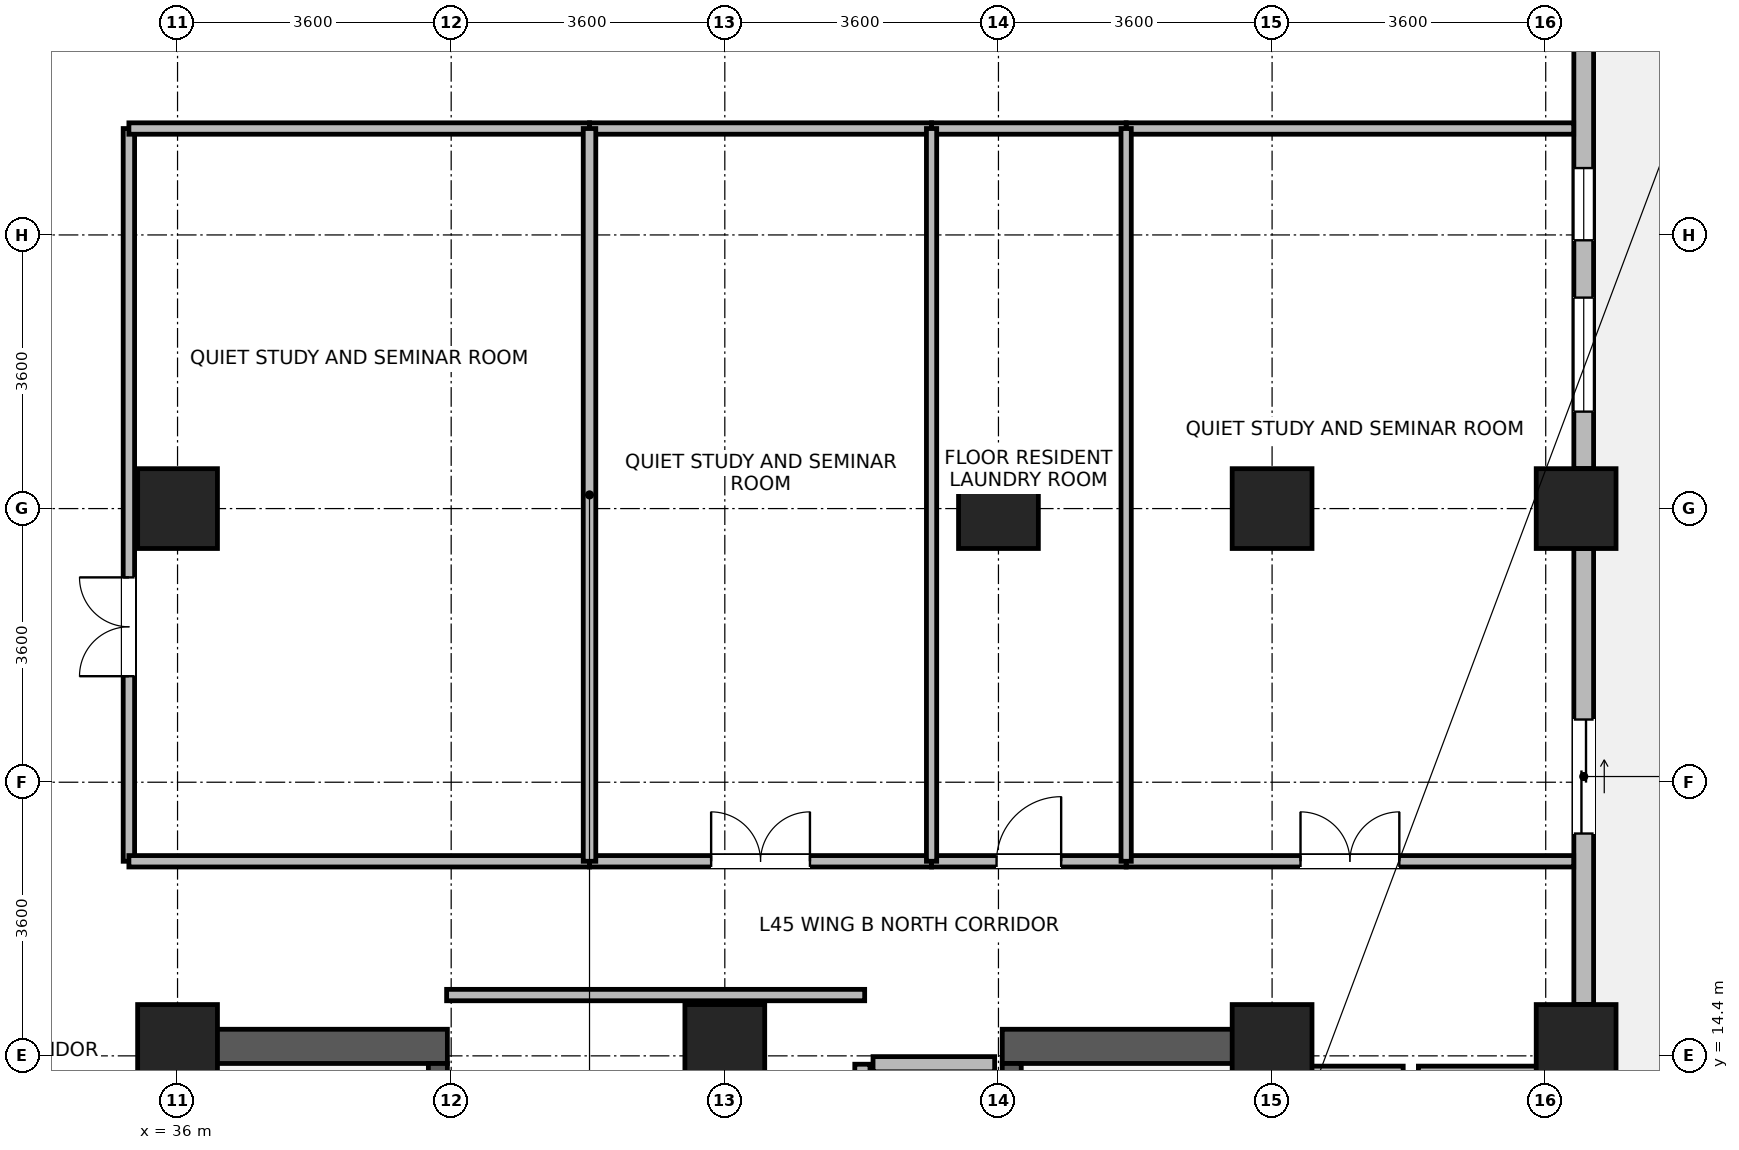
"""IFC4 building model, lengths in metres.
Left out: names, types, materials, properties, quantities, classifications, styles, units other than length and angle.
Written with IfcOpenShell. Run it as: python <this file> out.ifc"""

import sys

from ifc_helpers import new_model, si_unit, direction, frame, frame_2d, origin, origin_2d, place, context, subcontext, project, spatial, rectangle, extrude, source, transform, mapped, element, fill, save


model = new_model("IFC4")
c1 = context("Model", 3, precision=1e-05, world=origin(), true_north=direction((0.0, 1.0)))
c2 = subcontext(c1, "Body", "Model", "MODEL_VIEW")
j1 = project(units=[si_unit("LENGTHUNIT", "METRE"), si_unit("PLANEANGLEUNIT", "RADIAN")], contexts=[c1])
p1 = place(None, origin())
s1 = spatial("IfcSite", under=j1, at=p1, CompositionType="ELEMENT")
p2 = place(p1, origin())
s2 = spatial("IfcBuilding", under=s1, at=p2, CompositionType="ELEMENT")
p3 = place(p2, frame((0.0, 0.0, 177.2)))
s3 = spatial("IfcBuildingStorey", under=s2, at=p3, CompositionType="ELEMENT", Elevation=177.2)
for number, where, z_axis, x_axis in (
    (1, (36.125, 6.85, 0.0), (0.0, 0.0, 1.0), (0.0, 1.0, 0.0)),
    (2, (50.275, 6.85, 0.0), (0.0, 0.0, 1.0), (0.0, 1.0, 0.0)),
):
    element("IfcWall", number, at=place(p3, frame(where, z_axis=z_axis, x_axis=x_axis)), inside=s3, PredefinedType="SHEAR", context=c2, shape_type="SweptSolid", body=[
        extrude(rectangle(XDim=7.9, YDim=0.45, at=frame_2d((3.95, 0.0))), origin(), (0.0, 0.0, 1.0), 3.46),
    ])
for number, where, z_axis, x_axis in (
    (3, (36.35, 14.525, 0.0), (0.0, 0.0, 1.0), (1.0, 0.0, 0.0)),
    (4, (46.85, 14.525, 0.0), (0.0, 0.0, 1.0), (1.0, 0.0, 0.0)),
):
    element("IfcWall", number, at=place(p3, frame(where, z_axis=z_axis, x_axis=x_axis)), inside=s3, PredefinedType="SHEAR", context=c2, shape_type="SweptSolid", body=[
        extrude(rectangle(XDim=3.2, YDim=0.45, at=frame_2d((1.6, 0.0))), origin(), (0.0, 0.0, 1.0), 3.46),
    ])
p4 = place(p3, frame((39.425, 7.3, 0.0), z_axis=(0.0, 0.0, 1.0), x_axis=(0.0, 1.0, 0.0)))
e5 = element("IfcWall", 5, at=p4, inside=s3, PredefinedType="SHEAR", context=c2, shape_type="SweptSolid", body=[
    extrude(rectangle(XDim=7.0, YDim=0.25, at=frame_2d((3.5, 0.0))), origin(), (0.0, 0.0, 1.0), 3.46),
])
p5 = place(p4, frame((0.15, 0.0, 0.0)))
e6 = element("IfcOpeningElement", 6, at=p5, cuts=e5, PredefinedType="OPENING", context=c2, shape_type="SweptSolid", body=[
    extrude(rectangle(XDim=1.1, YDim=2.08, at=frame_2d((0.55, 1.04))), frame((0.0, 0.135, 0.0), z_axis=(0.0, -1.0, 0.0), x_axis=(1.0, 0.0, 0.0)), (0.0, 0.0, 1.0), 0.27),
])
p6 = place(p3, frame((46.975, 7.3, 0.0), z_axis=(0.0, 0.0, 1.0), x_axis=(0.0, 1.0, 0.0)))
e7 = element("IfcWall", 7, at=p6, inside=s3, PredefinedType="SHEAR", context=c2, shape_type="SweptSolid", body=[
    extrude(rectangle(XDim=7.0, YDim=0.25, at=frame_2d((3.5, 0.0))), origin(), (0.0, 0.0, 1.0), 3.46),
])
p7 = place(p6, frame((0.15, 0.0, 0.0)))
e8 = element("IfcOpeningElement", 8, at=p7, cuts=e7, PredefinedType="OPENING", context=c2, shape_type="SweptSolid", body=[
    extrude(rectangle(XDim=1.1, YDim=2.08, at=frame_2d((0.55, 1.04))), frame((0.0, 0.135, 0.0), z_axis=(0.0, -1.0, 0.0), x_axis=(1.0, 0.0, 0.0)), (0.0, 0.0, 1.0), 0.27),
])
m1 = source(origin(), c2, "Body", "SweptSolid", [
    extrude(rectangle(XDim=1.05, YDim=1.05, at=origin_2d()), origin(), (0.0, 0.0, 1.0), 3.7),
])
for number, where, z_axis, x_axis in (
    (9, (36.0, 21.6, 0.0), (0.0, 0.0, 1.0), (1.0, 0.0, 0.0)),
    (10, (46.8, 21.6, 0.0), (0.0, 0.0, 1.0), (1.0, 0.0, 0.0)),
    (11, (36.0, 14.55, 0.0), (0.0, 0.0, 1.0), (1.0, 0.0, 0.0)),
    (12, (43.2, 14.55, 0.0), (0.0, 0.0, 1.0), (1.0, 0.0, 0.0)),
    (13, (50.4, 14.55, 0.0), (0.0, 0.0, 1.0), (1.0, 0.0, 0.0)),
    (14, (50.4, 21.6, 0.0), (0.0, 0.0, 1.0), (1.0, 0.0, 0.0)),
    (15, (54.4, 14.55, 0.0), (0.0, 0.0, 1.0), (1.0, 0.0, 0.0)),
    (16, (54.4, 21.6, 0.0), (0.0, 0.0, 1.0), (1.0, 0.0, 0.0)),
):
    element("IfcColumn", number, at=place(p3, frame(where, z_axis=z_axis, x_axis=x_axis)), inside=s3, PredefinedType="COLUMN", context=c2, shape_type="MappedRepresentation", body=[
        mapped(m1, transform((0.0, 0.0, 0.0), x_axis=(1.0, 0.0, 0.0), y_axis=(0.0, 1.0, 0.0), z_axis=(0.0, 0.0, 1.0), scale=1.0)),
    ])
p8 = place(p3, frame((54.5, 21.074, 0.0), z_axis=(0.0, 0.0, 1.0), x_axis=(0.0, -1.0, 0.0)))
e17 = element("IfcWall", 17, at=p8, inside=s3, PredefinedType="STANDARD", context=c2, shape_type="SweptSolid", body=[
    extrude(rectangle(XDim=5.998, YDim=0.26, at=frame_2d((2.999, 0.0))), origin(), (0.0, 0.0, 1.0), 2.99),
])
p9 = place(p8, frame((2.249, 0.0, 0.0)))
e18 = element("IfcOpeningElement", 18, at=p9, cuts=e17, PredefinedType="OPENING", context=c2, shape_type="SweptSolid", body=[
    extrude(rectangle(XDim=1.5, YDim=2.15, at=frame_2d((0.75, 1.075))), frame((0.0, 0.14, 0.0), z_axis=(0.0, -1.0, 0.0), x_axis=(1.0, 0.0, 0.0)), (0.0, 0.0, 1.0), 0.28),
])
p10 = place(p3, frame((54.5, 28.124, 0.0), z_axis=(0.0, 0.0, 1.0), x_axis=(0.0, -1.0, 0.0)))
e19 = element("IfcWall", 19, at=p10, inside=s3, PredefinedType="STANDARD", context=c2, shape_type="SweptSolid", body=[
    extrude(rectangle(XDim=5.998, YDim=0.26, at=frame_2d((2.999, 0.0))), origin(), (0.0, 0.0, 1.0), 2.99),
])
p11 = place(p10, frame((3.749, 0.0, 0.85)))
e20 = element("IfcOpeningElement", 20, at=p11, cuts=e19, PredefinedType="OPENING", context=c2, shape_type="SweptSolid", body=[
    extrude(rectangle(XDim=1.5, YDim=1.85, at=frame_2d((0.75, 0.925))), frame((0.0, 0.14, 0.0), z_axis=(0.0, -1.0, 0.0), x_axis=(1.0, 0.0, 0.0)), (0.0, 0.0, 1.0), 0.28),
])
p12 = place(p10, frame((2.044, 0.0, 0.85)))
e21 = element("IfcOpeningElement", 21, at=p12, cuts=e19, PredefinedType="OPENING", context=c2, shape_type="SweptSolid", body=[
    extrude(rectangle(XDim=0.95, YDim=1.75, at=frame_2d((0.475, 0.875))), frame((0.0, 0.14, 0.0), z_axis=(0.0, -1.0, 0.0), x_axis=(1.0, 0.0, 0.0)), (0.0, 0.0, 1.0), 0.28),
])
p13 = place(p3, frame((50.475, 14.165, 0.0), z_axis=(0.0, 0.0, 1.0), x_axis=(1.0, 0.0, 0.0)))
e22 = element("IfcWall", 22, at=p13, inside=s3, PredefinedType="PARTITIONING", context=c2, shape_type="SweptSolid", body=[
    extrude(rectangle(XDim=1.65, YDim=0.2, at=frame_2d((0.825, 0.0))), origin(), (0.0, 0.0, 1.0), 3.44),
])
p14 = place(p3, frame((52.325, 14.165, 0.0), z_axis=(0.0, 0.0, 1.0), x_axis=(1.0, 0.0, 0.0)))
e23 = element("IfcWall", 23, at=p14, inside=s3, PredefinedType="PARTITIONING", context=c2, shape_type="SweptSolid", body=[
    extrude(rectangle(XDim=1.65, YDim=0.2, at=frame_2d((0.825, 0.0))), origin(), (0.0, 0.0, 1.0), 3.44),
])
p15 = place(p3, frame((45.15, 14.29, 0.0), z_axis=(0.0, 0.0, 1.0), x_axis=(1.0, 0.0, 0.0)))
e24 = element("IfcWall", 24, at=p15, inside=s3, PredefinedType="PARTITIONING", context=c2, shape_type="SweptSolid", body=[
    extrude(rectangle(XDim=1.6, YDim=0.2, at=frame_2d((0.8, 0.0))), origin(), (0.0, 0.0, 1.0), 2.44),
])
p16 = place(p3, frame((45.01, 11.61, 0.0), z_axis=(0.0, 0.0, 1.0), x_axis=(0.0, 1.0, 0.0)))
e25 = element("IfcWall", 25, at=p16, inside=s3, PredefinedType="PARTITIONING", context=c2, shape_type="SweptSolid", body=[
    extrude(rectangle(XDim=2.68, YDim=0.2, at=frame_2d((1.34, 0.0))), origin(), (0.0, 0.0, 1.0), 3.44),
])
p17 = place(p3, frame((35.36, 16.96, 0.0), z_axis=(0.0, 0.0, 1.0), x_axis=(0.0, 1.0, 0.0)))
e26 = element("IfcWall", 26, at=p17, inside=s3, PredefinedType="PARTITIONING", context=c2, shape_type="SweptSolid", body=[
    extrude(rectangle(XDim=9.64, YDim=0.15, at=frame_2d((4.82, 0.0))), origin(), (0.0, 0.0, 1.0), 3.44),
])
p18 = place(p17, frame((2.435, 0.0, 0.0)))
e27 = element("IfcOpeningElement", 27, at=p18, cuts=e26, PredefinedType="OPENING", context=c2, shape_type="SweptSolid", body=[
    extrude(rectangle(XDim=1.3, YDim=2.12, at=frame_2d((0.65, 1.06))), frame((0.0, 0.085, 0.0), z_axis=(0.0, -1.0, 0.0), x_axis=(1.0, 0.0, 0.0)), (0.0, 0.0, 1.0), 0.17),
])
for number, where, z_axis, x_axis in (
    (28, (35.36, 16.96, 0.0), (0.0, 0.0, 1.0), (1.0, 0.0, 0.0)),
    (29, (35.36, 26.6, 0.0), (0.0, 0.0, 1.0), (1.0, 0.0, 0.0)),
):
    element("IfcWall", number, at=place(p3, frame(where, z_axis=z_axis, x_axis=x_axis)), inside=s3, PredefinedType="PARTITIONING", context=c2, shape_type="SweptSolid", body=[
        extrude(rectangle(XDim=6.06, YDim=0.15, at=frame_2d((3.03, 0.0))), origin(), (0.0, 0.0, 1.0), 3.44),
    ])
p19 = place(p3, frame((48.48, 16.96, 0.0), z_axis=(0.0, 0.0, 1.0), x_axis=(1.0, 0.0, 0.0)))
e30 = element("IfcWall", 30, at=p19, inside=s3, PredefinedType="PARTITIONING", context=c2, shape_type="SweptSolid", body=[
    extrude(rectangle(XDim=5.888, YDim=0.15, at=frame_2d((2.944, 0.0))), origin(), (0.0, 0.0, 1.0), 3.44),
])
p20 = place(p19, frame((2.294, 0.0, 0.0)))
e31 = element("IfcOpeningElement", 31, at=p20, cuts=e30, PredefinedType="OPENING", context=c2, shape_type="SweptSolid", body=[
    extrude(rectangle(XDim=1.3, YDim=2.12, at=frame_2d((0.65, 1.06))), frame((0.0, 0.085, 0.0), z_axis=(0.0, -1.0, 0.0), x_axis=(1.0, 0.0, 0.0)), (0.0, 0.0, 1.0), 0.17),
])
p21 = place(p3, frame((48.48, 26.6, 0.0), z_axis=(0.0, 0.0, 1.0), x_axis=(1.0, 0.0, 0.0)))
e32 = element("IfcWall", 32, at=p21, inside=s3, PredefinedType="PARTITIONING", context=c2, shape_type="SweptSolid", body=[
    extrude(rectangle(XDim=5.888, YDim=0.15, at=frame_2d((2.944, 0.0))), origin(), (0.0, 0.0, 1.0), 3.44),
])
p22 = place(p3, frame((39.54, 15.2, 0.0), z_axis=(0.0, 0.0, 1.0), x_axis=(1.0, 0.0, 0.0)))
e33 = element("IfcWall", 33, at=p22, inside=s3, PredefinedType="PARTITIONING", context=c2, shape_type="SweptSolid", body=[
    extrude(rectangle(XDim=5.5, YDim=0.15, at=frame_2d((2.75, 0.0))), origin(), (0.0, 0.0, 1.0), 3.44),
])
p23 = place(p3, frame((41.42, 16.96, 0.0), z_axis=(0.0, 0.0, 1.0), x_axis=(1.0, 0.0, 0.0)))
e34 = element("IfcWall", 34, at=p23, inside=s3, PredefinedType="PARTITIONING", context=c2, shape_type="SweptSolid", body=[
    extrude(rectangle(XDim=4.5, YDim=0.15, at=frame_2d((2.25, 0.0))), origin(), (0.0, 0.0, 1.0), 3.44),
])
p24 = place(p23, frame((1.6, 0.0, 0.0)))
e35 = element("IfcOpeningElement", 35, at=p24, cuts=e34, PredefinedType="OPENING", context=c2, shape_type="SweptSolid", body=[
    extrude(rectangle(XDim=1.3, YDim=2.12, at=frame_2d((0.65, 1.06))), frame((0.0, 0.085, 0.0), z_axis=(0.0, -1.0, 0.0), x_axis=(1.0, 0.0, 0.0)), (0.0, 0.0, 1.0), 0.17),
])
p25 = place(p3, frame((41.42, 26.6, 0.0), z_axis=(0.0, 0.0, 1.0), x_axis=(1.0, 0.0, 0.0)))
e36 = element("IfcWall", 36, at=p25, inside=s3, PredefinedType="PARTITIONING", context=c2, shape_type="SweptSolid", body=[
    extrude(rectangle(XDim=4.5, YDim=0.15, at=frame_2d((2.25, 0.0))), origin(), (0.0, 0.0, 1.0), 3.44),
])
p26 = place(p3, frame((45.92, 16.96, 0.0), z_axis=(0.0, 0.0, 1.0), x_axis=(1.0, 0.0, 0.0)))
e37 = element("IfcWall", 37, at=p26, inside=s3, PredefinedType="PARTITIONING", context=c2, shape_type="SweptSolid", body=[
    extrude(rectangle(XDim=2.56, YDim=0.15, at=frame_2d((1.28, 0.0))), origin(), (0.0, 0.0, 1.0), 3.44),
])
p27 = place(p26, frame((0.855, 0.0, 0.0)))
e38 = element("IfcOpeningElement", 38, at=p27, cuts=e37, PredefinedType="OPENING", context=c2, shape_type="SweptSolid", body=[
    extrude(rectangle(XDim=0.85, YDim=2.04, at=frame_2d((0.425, 1.02))), frame((0.0, 0.085, 0.0), z_axis=(0.0, -1.0, 0.0), x_axis=(1.0, 0.0, 0.0)), (0.0, 0.0, 1.0), 0.17),
])
p28 = place(p3, frame((45.92, 26.6, 0.0), z_axis=(0.0, 0.0, 1.0), x_axis=(1.0, 0.0, 0.0)))
e39 = element("IfcWall", 39, at=p28, inside=s3, PredefinedType="PARTITIONING", context=c2, shape_type="SweptSolid", body=[
    extrude(rectangle(XDim=2.56, YDim=0.15, at=frame_2d((1.28, 0.0))), origin(), (0.0, 0.0, 1.0), 3.44),
])
p29 = place(p3, frame((41.42, 16.96, 0.0), z_axis=(0.0, 0.0, 1.0), x_axis=(0.0, 1.0, 0.0)))
e40 = element("IfcWall", 40, at=p29, inside=s3, PredefinedType="PARTITIONING", context=c2, shape_type="SweptSolid", body=[
    extrude(rectangle(XDim=9.64, YDim=0.165, at=frame_2d((4.82, 0.0))), origin(), (0.0, 0.0, 1.0), 3.44),
])
for number, where, z_axis, x_axis in (
    (41, (45.92, 16.96, 0.0), (0.0, 0.0, 1.0), (0.0, 1.0, 0.0)),
    (42, (48.48, 16.96, 0.0), (0.0, 0.0, 1.0), (0.0, 1.0, 0.0)),
):
    element("IfcWall", number, at=place(p3, frame(where, z_axis=z_axis, x_axis=x_axis)), inside=s3, PredefinedType="PARTITIONING", context=c2, shape_type="SweptSolid", body=[
        extrude(rectangle(XDim=9.64, YDim=0.135, at=frame_2d((4.82, 0.0))), origin(), (0.0, 0.0, 1.0), 3.44),
    ])
p30 = place(p9, origin())
e43 = element("IfcDoor", 43, at=p30, inside=s3, OperationType="SLIDING_TO_LEFT", PredefinedType="DOOR", context=c2, shape_type="SweptSolid", body=[
    extrude(rectangle(XDim=1.5, YDim=2.15, at=frame_2d((0.75, 1.075))), frame((0.0, 0.025, 0.0), z_axis=(0.0, -1.0, 0.0), x_axis=(1.0, 0.0, 0.0)), (0.0, 0.0, 1.0), 0.05),
])
fill(e18, e43)
p31 = place(p11, origin())
e44 = element("IfcWindow", 44, at=p31, inside=s3, PartitioningType="SINGLE_PANEL", PredefinedType="WINDOW", context=c2, shape_type="SweptSolid", body=[
    extrude(rectangle(XDim=1.5, YDim=1.85, at=frame_2d((0.75, 0.925))), frame((0.0, 0.03, 0.0), z_axis=(0.0, -1.0, 0.0), x_axis=(1.0, 0.0, 0.0)), (0.0, 0.0, 1.0), 0.06),
])
fill(e20, e44)
p32 = place(p12, origin())
e45 = element("IfcWindow", 45, at=p32, inside=s3, PartitioningType="SINGLE_PANEL", PredefinedType="WINDOW", context=c2, shape_type="SweptSolid", body=[
    extrude(rectangle(XDim=0.95, YDim=1.75, at=frame_2d((0.475, 0.875))), frame((0.0, 0.03, 0.0), z_axis=(0.0, -1.0, 0.0), x_axis=(1.0, 0.0, 0.0)), (0.0, 0.0, 1.0), 0.06),
])
fill(e21, e45)
p33 = place(p18, origin())
e46 = element("IfcDoor", 46, at=p33, inside=s3, OperationType="DOUBLE_DOOR_SINGLE_SWING", PredefinedType="DOOR", context=c2, shape_type="SweptSolid", body=[
    extrude(rectangle(XDim=1.3, YDim=2.12, at=frame_2d((0.65, 1.06))), frame((0.0, 0.025, 0.0), z_axis=(0.0, -1.0, 0.0), x_axis=(1.0, 0.0, 0.0)), (0.0, 0.0, 1.0), 0.05),
])
fill(e27, e46)
p34 = place(p20, origin())
e47 = element("IfcDoor", 47, at=p34, inside=s3, OperationType="DOUBLE_DOOR_SINGLE_SWING", PredefinedType="DOOR", context=c2, shape_type="SweptSolid", body=[
    extrude(rectangle(XDim=1.3, YDim=2.12, at=frame_2d((0.65, 1.06))), frame((0.0, 0.025, 0.0), z_axis=(0.0, -1.0, 0.0), x_axis=(1.0, 0.0, 0.0)), (0.0, 0.0, 1.0), 0.05),
])
fill(e31, e47)
p35 = place(p24, origin())
e48 = element("IfcDoor", 48, at=p35, inside=s3, OperationType="DOUBLE_DOOR_SINGLE_SWING", PredefinedType="DOOR", context=c2, shape_type="SweptSolid", body=[
    extrude(rectangle(XDim=1.3, YDim=2.12, at=frame_2d((0.65, 1.06))), frame((0.0, 0.025, 0.0), z_axis=(0.0, -1.0, 0.0), x_axis=(1.0, 0.0, 0.0)), (0.0, 0.0, 1.0), 0.05),
])
fill(e35, e48)
p36 = place(p27, origin())
e49 = element("IfcDoor", 49, at=p36, inside=s3, OperationType="SINGLE_SWING_RIGHT", PredefinedType="DOOR", context=c2, shape_type="SweptSolid", body=[
    extrude(rectangle(XDim=0.85, YDim=2.04, at=frame_2d((0.425, 1.02))), frame((0.0, 0.025, 0.0), z_axis=(0.0, -1.0, 0.0), x_axis=(1.0, 0.0, 0.0)), (0.0, 0.0, 1.0), 0.05),
])
fill(e38, e49)
save(model, sys.argv[1])
